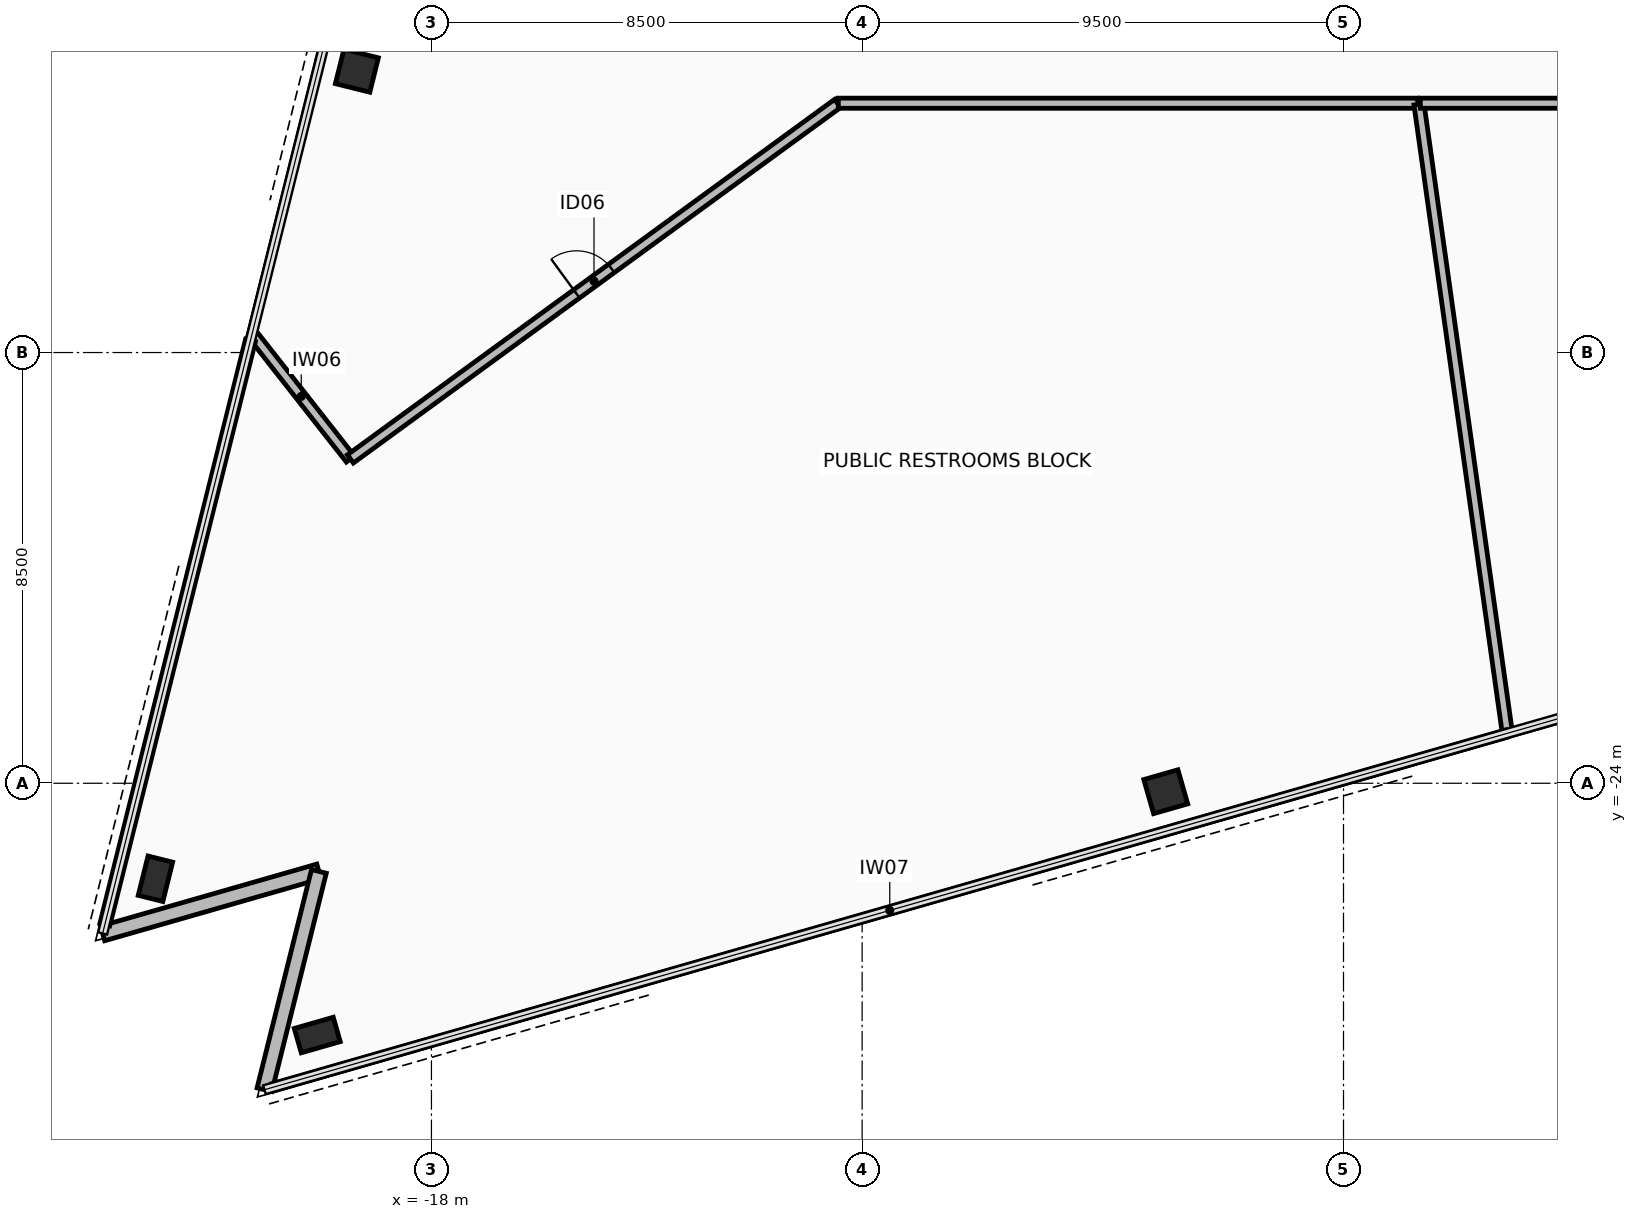
"""IFC4 building model, lengths in metres.
Left out: names, types, materials, properties, quantities, classifications, styles, units other than length and angle.
Written with IfcOpenShell. Run it as: python <this file> out.ifc"""

import sys

from ifc_helpers import new_model, si_unit, direction, frame, frame_2d, origin, origin_2d, place, context, subcontext, project, spatial, rectangle, hollow_rectangle, extrude, element, fill, save


model = new_model("IFC4")
c1 = context("Model", 3, precision=1e-05, world=origin(), true_north=direction((0.0, 1.0)))
c2 = subcontext(c1, "Body", "Model", "MODEL_VIEW")
j1 = project(units=[si_unit("LENGTHUNIT", "METRE"), si_unit("PLANEANGLEUNIT", "RADIAN")], contexts=[c1])
p1 = place(None, origin())
s1 = spatial("IfcSite", under=j1, at=p1, CompositionType="ELEMENT")
p2 = place(p1, origin())
s2 = spatial("IfcBuilding", under=s1, at=p2, CompositionType="ELEMENT")
p3 = place(p2, frame((0.0, 0.0, 100.5)))
s3 = spatial("IfcBuildingStorey", under=s2, at=p3, CompositionType="ELEMENT", Elevation=100.5)
p4 = place(p3, frame((-19.472, -9.939, 0.0), z_axis=(0.0, 0.0, 1.0), x_axis=(0.2419218956, 0.970295726276, 0.0)))
e1 = element("IfcColumn", 1, at=p4, inside=s3, PredefinedType="COLUMN", context=c2, shape_type="SweptSolid", body=[
    extrude(hollow_rectangle(XDim=0.7, YDim=0.7, WallThickness=0.04, at=origin_2d()), origin(), (0.0, 0.0, 1.0), 3.6),
])
for number, where, z_axis, x_axis in (
    (2, (-23.447, -25.885, 0.0), (0.0, 0.0, 1.0), (0.242, 0.97, 0.0)),
    (3, (-20.253, -28.969, 0.0), (0.0, 0.0, 1.0), (0.961, 0.276, 0.0)),
):
    element("IfcColumn", number, at=place(p3, frame(where, z_axis=z_axis, x_axis=x_axis)), inside=s3, PredefinedType="COLUMN", context=c2, shape_type="SweptSolid", body=[
        extrude(hollow_rectangle(XDim=0.5, YDim=0.8, WallThickness=0.04, at=origin_2d()), origin(), (0.0, 0.0, 1.0), 3.6),
    ])
p5 = place(p3, frame((-3.508, -24.167, 0.0), z_axis=(0.0, 0.0, 1.0), x_axis=(0.961261695938, 0.275637355817, 0.0)))
e4 = element("IfcColumn", 4, at=p5, inside=s3, PredefinedType="COLUMN", context=c2, shape_type="SweptSolid", body=[
    extrude(hollow_rectangle(XDim=0.7, YDim=0.7, WallThickness=0.04, at=origin_2d()), origin(), (0.0, 0.0, 1.0), 3.6),
])
p6 = place(p3, frame((-24.489, -26.964, 0.0), z_axis=(0.0, 0.0, 1.0), x_axis=(0.961259988927, 0.275643308803, 0.0)))
e5 = element("IfcWall", 5, at=p6, inside=s3, PredefinedType="STANDARD", context=c2, shape_type="SweptSolid", body=[
    extrude(rectangle(XDim=4.44, YDim=0.3, at=frame_2d((2.22, 0.0))), origin(), (0.0, 0.0, 1.0), 2.605),
])
p7 = place(p3, frame((-20.221, -25.74, 0.0), z_axis=(0.0, 0.0, 1.0), x_axis=(-0.241940431812, -0.970291104491, 0.0)))
e6 = element("IfcWall", 6, at=p7, inside=s3, PredefinedType="STANDARD", context=c2, shape_type="SweptSolid", body=[
    extrude(rectangle(XDim=4.44, YDim=0.3, at=frame_2d((2.22, 0.0))), origin(), (0.0, 0.0, 1.0), 2.605),
])
p8 = place(p3, frame((-21.539, -15.132, 0.0), z_axis=(0.0, 0.0, 1.0), x_axis=(0.617821551932, -0.786318338822, 0.0)))
e7 = element("IfcWall", 7, at=p8, inside=s3, PredefinedType="PARTITIONING", context=c2, shape_type="SweptSolid", body=[
    extrude(rectangle(XDim=3.138, YDim=0.2, at=frame_2d((1.569, 0.0))), origin(), (0.0, 0.0, 1.0), 2.605),
])
p9 = place(p3, frame((-19.6, -17.6, 0.0), z_axis=(0.0, 0.0, 1.0), x_axis=(0.807841894842, 0.589399247486, 0.0)))
e8 = element("IfcWall", 8, at=p9, inside=s3, PredefinedType="PARTITIONING", context=c2, shape_type="SweptSolid", body=[
    extrude(rectangle(XDim=11.902, YDim=0.2, at=frame_2d((5.951, 0.0))), origin(), (0.0, 0.0, 1.0), 2.805),
])
p10 = place(p9, frame((5.526, 0.0, 0.0)))
e9 = element("IfcOpeningElement", 9, at=p10, cuts=e8, PredefinedType="OPENING", context=c2, shape_type="SweptSolid", body=[
    extrude(rectangle(XDim=0.85, YDim=2.1, at=frame_2d((0.425, 1.05))), frame((0.0, 0.11, 0.0), z_axis=(0.0, -1.0, 0.0), x_axis=(1.0, 0.0, 0.0)), (0.0, 0.0, 1.0), 0.22),
])
p11 = place(p3, frame((-9.97, -10.58, 0.0), z_axis=(0.0, 0.0, 1.0), x_axis=(1.0, 0.0, 0.0)))
e10 = element("IfcWall", 10, at=p11, inside=s3, PredefinedType="PARTITIONING", context=c2, shape_type="SweptSolid", body=[
    extrude(rectangle(XDim=11.435, YDim=0.2, at=frame_2d((5.718, 0.0))), origin(), (0.0, 0.0, 1.0), 2.805),
])
p12 = place(p3, frame((1.49, -10.602, 0.0), z_axis=(0.0, 0.0, 1.0), x_axis=(0.139175607773, -0.990267716429, 0.0)))
e11 = element("IfcWall", 11, at=p12, inside=s3, PredefinedType="PARTITIONING", context=c2, shape_type="SweptSolid", body=[
    extrude(rectangle(XDim=12.513, YDim=0.2, at=frame_2d((6.256, 0.0))), origin(), (0.0, 0.0, 1.0), 2.605),
])
p13 = place(p3, frame((3.213, -23.02, 0.0), z_axis=(0.0, 0.0, 1.0), x_axis=(-0.961261509508, -0.275638005977, 0.0)))
e12 = element("IfcWall", 12, at=p13, inside=s3, PredefinedType="PARTITIONING", context=c2, shape_type="SweptSolid", body=[
    extrude(rectangle(XDim=25.318, YDim=0.15, at=frame_2d((12.659, 0.0))), origin(), (0.0, 0.0, 1.0), 3.41),
])
p14 = place(p3, frame((-24.446, -26.79, 0.0), z_axis=(0.0, 0.0, 1.0), x_axis=(0.241921580704, 0.970295804788, 0.0)))
e13 = element("IfcWall", 13, at=p14, inside=s3, PredefinedType="PARTITIONING", context=c2, shape_type="SweptSolid", body=[
    extrude(rectangle(XDim=11.882, YDim=0.2, at=frame_2d((5.941, 0.0))), origin(), (0.0, 0.0, 1.0), 3.41),
])
p15 = place(p3, frame((1.516, -10.58, 0.0), z_axis=(0.0, 0.0, 1.0), x_axis=(1.0, 0.0, 0.0)))
e14 = element("IfcWall", 14, at=p15, inside=s3, PredefinedType="PARTITIONING", context=c2, shape_type="SweptSolid", body=[
    extrude(rectangle(XDim=8.454, YDim=0.2, at=frame_2d((4.227, 0.0))), origin(), (0.0, 0.0, 1.0), 2.805),
])
p16 = place(p10, origin())
e15 = element("IfcDoor", 15, at=p16, inside=s3, OperationType="SINGLE_SWING_RIGHT", PredefinedType="DOOR", context=c2, shape_type="SweptSolid", body=[
    extrude(rectangle(XDim=0.85, YDim=2.1, at=frame_2d((0.425, 1.05))), frame((0.0, 0.025, 0.0), z_axis=(0.0, -1.0, 0.0), x_axis=(1.0, 0.0, 0.0)), (0.0, 0.0, 1.0), 0.05),
])
fill(e9, e15)
save(model, sys.argv[1])
